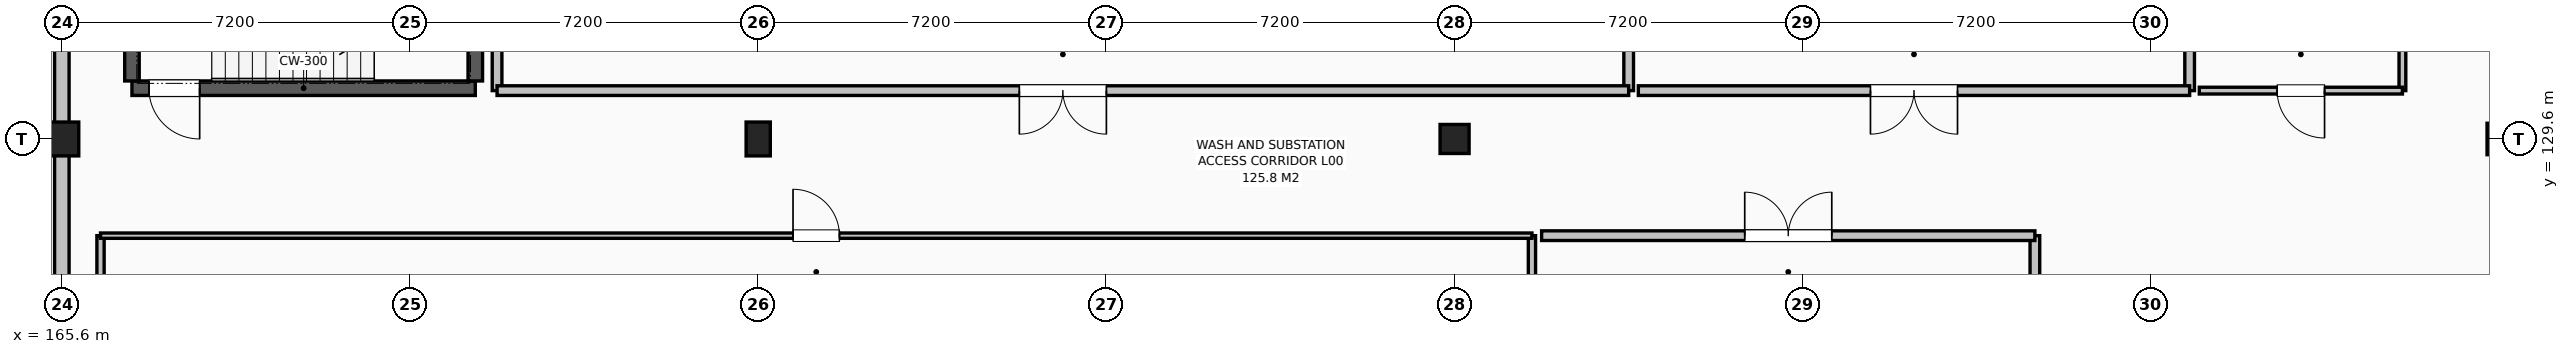
"""IFC4 building model, lengths in metres.
Left out: names, types, materials, properties, quantities, classifications, styles, units other than length and angle.
Written with IfcOpenShell. Run it as: python <this file> out.ifc"""

import sys

from ifc_helpers import new_model, si_unit, direction, frame, frame_2d, origin, origin_2d, place, context, subcontext, project, spatial, rectangle, circle, extrude, element, fill, save


model = new_model("IFC4")
c1 = context("Model", 3, precision=1e-05, world=origin(), true_north=direction((0.0, 1.0)))
c2 = subcontext(c1, "Body", "Model", "MODEL_VIEW")
j1 = project(units=[si_unit("LENGTHUNIT", "METRE"), si_unit("PLANEANGLEUNIT", "RADIAN")], contexts=[c1])
p1 = place(None, origin())
s1 = spatial("IfcSite", under=j1, at=p1, CompositionType="ELEMENT")
p2 = place(p1, origin())
s2 = spatial("IfcBuilding", under=s1, at=p2, CompositionType="ELEMENT")
p3 = place(p2, origin())
s3 = spatial("IfcBuildingStorey", under=s2, at=p3, CompositionType="ELEMENT", Elevation=0.0)
p4 = place(p3, frame((165.6, 129.6, 0.0), z_axis=(0.0, 0.0, 1.0), x_axis=(1.0, 0.0, 0.0)))
e1 = element("IfcColumn", 1, at=p4, inside=s3, PredefinedType="COLUMN", context=c2, shape_type="SweptSolid", body=[
    extrude(rectangle(XDim=0.7, YDim=0.7, at=origin_2d()), origin(), (0.0, 0.0, 1.0), 4.8),
])
p5 = place(p3, frame((180.0, 129.6, 0.0), z_axis=(0.0, 0.0, 1.0), x_axis=(1.0, 0.0, 0.0)))
e2 = element("IfcColumn", 2, at=p5, inside=s3, PredefinedType="COLUMN", context=c2, shape_type="SweptSolid", body=[
    extrude(rectangle(XDim=0.5, YDim=0.7, at=origin_2d()), origin(), (0.0, 0.0, 1.0), 4.8),
])
p6 = place(p3, frame((194.4, 129.6, 0.0), z_axis=(0.0, 0.0, 1.0), x_axis=(1.0, 0.0, 0.0)))
e3 = element("IfcColumn", 3, at=p6, inside=s3, PredefinedType="COLUMN", context=c2, shape_type="SweptSolid", body=[
    extrude(circle(Radius=0.3, at=origin_2d()), origin(), (0.0, 0.0, 1.0), 4.8),
])
p7 = place(p3, frame((216.0, 129.6, 0.0), z_axis=(0.0, 0.0, 1.0), x_axis=(1.0, 0.0, 0.0)))
e4 = element("IfcColumn", 4, at=p7, inside=s3, PredefinedType="COLUMN", context=c2, shape_type="SweptSolid", body=[
    extrude(rectangle(XDim=0.5, YDim=0.65, at=origin_2d()), origin(), (0.0, 0.0, 1.0), 4.8),
])
p8 = place(p3, frame((165.6, 144.0, 0.0), z_axis=(0.0, 0.0, 1.0), x_axis=(0.0, -1.0, 0.0)))
e5 = element("IfcWall", 5, at=p8, inside=s3, PredefinedType="SOLIDWALL", context=c2, shape_type="SweptSolid", body=[
    extrude(rectangle(XDim=28.8, YDim=0.3, at=frame_2d((14.4, 0.0))), origin(), (0.0, 0.0, 1.0), 4.25),
])
p9 = place(p8, frame((4.2, 0.0, 0.0)))
e6 = element("IfcOpeningElement", 6, at=p9, cuts=e5, PredefinedType="OPENING", context=c2, shape_type="SweptSolid", body=[
    extrude(rectangle(XDim=4.2, YDim=3.5, at=frame_2d((2.1, 1.75))), frame((0.0, 0.16, 0.0), z_axis=(0.0, -1.0, 0.0), x_axis=(1.0, 0.0, 0.0)), (0.0, 0.0, 1.0), 0.32),
])
p10 = place(p8, frame((18.2, 0.0, 0.0)))
e7 = element("IfcOpeningElement", 7, at=p10, cuts=e5, PredefinedType="OPENING", context=c2, shape_type="SweptSolid", body=[
    extrude(rectangle(XDim=4.2, YDim=3.5, at=frame_2d((2.1, 1.75))), frame((0.0, 0.16, 0.0), z_axis=(0.0, -1.0, 0.0), x_axis=(1.0, 0.0, 0.0)), (0.0, 0.0, 1.0), 0.32),
])
p11 = place(p3, frame((167.05, 130.65, 0.0), z_axis=(0.0, 0.0, 1.0), x_axis=(1.0, 0.0, 0.0)))
e8 = element("IfcWall", 8, at=p11, inside=s3, PredefinedType="SHEAR", context=c2, shape_type="SweptSolid", body=[
    extrude(rectangle(XDim=7.1, YDim=0.3, at=frame_2d((3.55, 0.0))), origin(), (0.0, 0.0, 1.0), 4.525),
])
p12 = place(p11, frame((0.35, 0.0, 0.0)))
e9 = element("IfcOpeningElement", 9, at=p12, cuts=e8, PredefinedType="OPENING", context=c2, shape_type="SweptSolid", body=[
    extrude(rectangle(XDim=1.05, YDim=2.15, at=frame_2d((0.525, 1.075))), frame((0.0, 0.16, 0.0), z_axis=(0.0, -1.0, 0.0), x_axis=(1.0, 0.0, 0.0)), (0.0, 0.0, 1.0), 0.32),
])
for number, where, z_axis, x_axis in (
    (10, (174.15, 130.8, 0.0), (0.0, 0.0, 1.0), (0.0, 1.0, 0.0)),
    (11, (167.05, 133.7, 0.0), (0.0, 0.0, 1.0), (0.0, -1.0, 0.0)),
):
    element("IfcWall", number, at=place(p3, frame(where, z_axis=z_axis, x_axis=x_axis)), inside=s3, PredefinedType="SHEAR", context=c2, shape_type="SweptSolid", body=[
        extrude(rectangle(XDim=2.9, YDim=0.3, at=frame_2d((1.45, 0.0))), origin(), (0.0, 0.0, 1.0), 4.525),
    ])
for number, where, z_axis, x_axis in (
    (12, (196.0, 116.45, 0.0), (0.0, 0.0, 1.0), (0.0, 1.0, 0.0)),
    (13, (166.4, 127.6, 0.0), (0.0, 0.0, 1.0), (0.0, -1.0, 0.0)),
):
    element("IfcWall", number, at=place(p3, frame(where, z_axis=z_axis, x_axis=x_axis)), inside=s3, PredefinedType="PARTITIONING", context=c2, shape_type="SweptSolid", body=[
        extrude(rectangle(XDim=11.15, YDim=0.15, at=frame_2d((5.575, 0.0))), origin(), (0.0, 0.0, 1.0), 4.1),
    ])
p13 = place(p3, frame((166.4, 127.6, 0.0), z_axis=(0.0, 0.0, 1.0), x_axis=(1.0, 0.0, 0.0)))
e14 = element("IfcWall", 14, at=p13, inside=s3, PredefinedType="PARTITIONING", context=c2, shape_type="SweptSolid", body=[
    extrude(rectangle(XDim=29.6, YDim=0.11, at=frame_2d((14.8, 0.0))), origin(), (0.0, 0.0, 1.0), 3.974),
])
p14 = place(p13, frame((14.32, 0.0, 0.0)))
e15 = element("IfcOpeningElement", 15, at=p14, cuts=e14, PredefinedType="OPENING", context=c2, shape_type="SweptSolid", body=[
    extrude(rectangle(XDim=0.96, YDim=2.15, at=frame_2d((0.48, 1.075))), frame((0.0, 0.065, 0.0), z_axis=(0.0, -1.0, 0.0), x_axis=(1.0, 0.0, 0.0)), (0.0, 0.0, 1.0), 0.13),
])
p15 = place(p3, frame((206.4, 116.45, 0.0), z_axis=(0.0, 0.0, 1.0), x_axis=(0.0, 1.0, 0.0)))
e16 = element("IfcWall", 16, at=p15, inside=s3, PredefinedType="SOLIDWALL", context=c2, shape_type="SweptSolid", body=[
    extrude(rectangle(XDim=11.15, YDim=0.2, at=frame_2d((5.575, 0.0))), origin(), (0.0, 0.0, 1.0), 4.1),
])
p16 = place(p3, frame((196.2, 127.6, 0.0), z_axis=(0.0, 0.0, 1.0), x_axis=(1.0, 0.0, 0.0)))
e17 = element("IfcWall", 17, at=p16, inside=s3, PredefinedType="SOLIDWALL", context=c2, shape_type="SweptSolid", body=[
    extrude(rectangle(XDim=10.2, YDim=0.2, at=frame_2d((5.1, 0.0))), origin(), (0.0, 0.0, 1.0), 4.1),
])
p17 = place(p16, frame((4.2, 0.0, 0.0)))
e18 = element("IfcOpeningElement", 18, at=p17, cuts=e17, PredefinedType="OPENING", context=c2, shape_type="SweptSolid", body=[
    extrude(rectangle(XDim=1.8, YDim=2.2, at=frame_2d((0.9, 1.1))), frame((0.0, 0.11, 0.0), z_axis=(0.0, -1.0, 0.0), x_axis=(1.0, 0.0, 0.0)), (0.0, 0.0, 1.0), 0.22),
])
for number, where, z_axis, x_axis in (
    (19, (198.0, 130.6, 0.0), (0.0, 0.0, 1.0), (0.0, 1.0, 0.0)),
    (20, (174.6, 142.75, 0.0), (0.0, 0.0, 1.0), (0.0, -1.0, 0.0)),
):
    element("IfcWall", number, at=place(p3, frame(where, z_axis=z_axis, x_axis=x_axis)), inside=s3, PredefinedType="SOLIDWALL", context=c2, shape_type="SweptSolid", body=[
        extrude(rectangle(XDim=12.15, YDim=0.2, at=frame_2d((6.075, 0.0))), origin(), (0.0, 0.0, 1.0), 4.1),
    ])
p18 = place(p3, frame((198.0, 130.6, 0.0), z_axis=(0.0, 0.0, 1.0), x_axis=(-1.0, 0.0, 0.0)))
e21 = element("IfcWall", 21, at=p18, inside=s3, PredefinedType="SOLIDWALL", context=c2, shape_type="SweptSolid", body=[
    extrude(rectangle(XDim=23.4, YDim=0.2, at=frame_2d((11.7, 0.0))), origin(), (0.0, 0.0, 1.0), 3.896),
])
p19 = place(p18, frame((10.8, 0.0, 0.0)))
e22 = element("IfcOpeningElement", 22, at=p19, cuts=e21, PredefinedType="OPENING", context=c2, shape_type="SweptSolid", body=[
    extrude(rectangle(XDim=1.8, YDim=2.2, at=frame_2d((0.9, 1.1))), frame((0.0, 0.11, 0.0), z_axis=(0.0, -1.0, 0.0), x_axis=(1.0, 0.0, 0.0)), (0.0, 0.0, 1.0), 0.22),
])
p20 = place(p3, frame((209.6, 130.6, 0.0), z_axis=(0.0, 0.0, 1.0), x_axis=(0.0, 1.0, 0.0)))
e23 = element("IfcWall", 23, at=p20, inside=s3, PredefinedType="SOLIDWALL", context=c2, shape_type="SweptSolid", body=[
    extrude(rectangle(XDim=12.15, YDim=0.2, at=frame_2d((6.075, 0.0))), origin(), (0.0, 0.0, 1.0), 4.1),
])
p21 = place(p3, frame((209.6, 130.6, 0.0), z_axis=(0.0, 0.0, 1.0), x_axis=(-1.0, 0.0, 0.0)))
e24 = element("IfcWall", 24, at=p21, inside=s3, PredefinedType="SOLIDWALL", context=c2, shape_type="SweptSolid", body=[
    extrude(rectangle(XDim=11.4, YDim=0.2, at=frame_2d((5.7, 0.0))), origin(), (0.0, 0.0, 1.0), 4.1),
])
p22 = place(p21, frame((4.8, 0.0, 0.0)))
e25 = element("IfcOpeningElement", 25, at=p22, cuts=e24, PredefinedType="OPENING", context=c2, shape_type="SweptSolid", body=[
    extrude(rectangle(XDim=1.8, YDim=2.2, at=frame_2d((0.9, 1.1))), frame((0.0, 0.11, 0.0), z_axis=(0.0, -1.0, 0.0), x_axis=(1.0, 0.0, 0.0)), (0.0, 0.0, 1.0), 0.22),
])
p23 = place(p3, frame((214.0, 130.6, 0.0), z_axis=(0.0, 0.0, 1.0), x_axis=(0.0, 1.0, 0.0)))
e26 = element("IfcWall", 26, at=p23, inside=s3, PredefinedType="PARTITIONING", context=c2, shape_type="SweptSolid", body=[
    extrude(rectangle(XDim=5.95, YDim=0.14, at=frame_2d((2.975, 0.0))), origin(), (0.0, 0.0, 1.0), 3.6),
])
p24 = place(p3, frame((214.0, 130.6, 0.0), z_axis=(0.0, 0.0, 1.0), x_axis=(-1.0, 0.0, 0.0)))
e27 = element("IfcWall", 27, at=p24, inside=s3, PredefinedType="PARTITIONING", context=c2, shape_type="SweptSolid", body=[
    extrude(rectangle(XDim=4.2, YDim=0.14, at=frame_2d((2.1, 0.0))), origin(), (0.0, 0.0, 1.0), 3.6),
])
p25 = place(p24, frame((1.61, 0.0, 0.0)))
e28 = element("IfcOpeningElement", 28, at=p25, cuts=e27, PredefinedType="OPENING", context=c2, shape_type="SweptSolid", body=[
    extrude(rectangle(XDim=0.98, YDim=2.15, at=frame_2d((0.49, 1.075))), frame((0.0, 0.08, 0.0), z_axis=(0.0, -1.0, 0.0), x_axis=(1.0, 0.0, 0.0)), (0.0, 0.0, 1.0), 0.16),
])
p26 = place(p12, frame((1.05, 0.0, 0.0), z_axis=(0.0, 0.0, 1.0), x_axis=(-1.0, 0.0, 0.0)))
e29 = element("IfcDoor", 29, at=p26, inside=s3, OperationType="SINGLE_SWING_LEFT", PredefinedType="DOOR", context=c2, shape_type="SweptSolid", body=[
    extrude(rectangle(XDim=1.05, YDim=2.15, at=frame_2d((0.525, 1.075))), frame((0.0, 0.025, 0.0), z_axis=(0.0, -1.0, 0.0), x_axis=(1.0, 0.0, 0.0)), (0.0, 0.0, 1.0), 0.05),
])
fill(e9, e29)
p27 = place(p14, origin())
e30 = element("IfcDoor", 30, at=p27, inside=s3, OperationType="SINGLE_SWING_LEFT", PredefinedType="DOOR", context=c2, shape_type="SweptSolid", body=[
    extrude(rectangle(XDim=0.96, YDim=2.15, at=frame_2d((0.48, 1.075))), frame((0.0, 0.025, 0.0), z_axis=(0.0, -1.0, 0.0), x_axis=(1.0, 0.0, 0.0)), (0.0, 0.0, 1.0), 0.05),
])
fill(e15, e30)
p28 = place(p17, origin())
e31 = element("IfcDoor", 31, at=p28, inside=s3, OperationType="DOUBLE_SWING_LEFT", PredefinedType="DOOR", context=c2, shape_type="SweptSolid", body=[
    extrude(rectangle(XDim=1.8, YDim=2.2, at=frame_2d((0.9, 1.1))), frame((0.0, 0.025, 0.0), z_axis=(0.0, -1.0, 0.0), x_axis=(1.0, 0.0, 0.0)), (0.0, 0.0, 1.0), 0.05),
])
fill(e18, e31)
p29 = place(p19, origin())
e32 = element("IfcDoor", 32, at=p29, inside=s3, OperationType="DOUBLE_SWING_LEFT", PredefinedType="DOOR", context=c2, shape_type="SweptSolid", body=[
    extrude(rectangle(XDim=1.8, YDim=2.2, at=frame_2d((0.9, 1.1))), frame((0.0, 0.025, 0.0), z_axis=(0.0, -1.0, 0.0), x_axis=(1.0, 0.0, 0.0)), (0.0, 0.0, 1.0), 0.05),
])
fill(e22, e32)
p30 = place(p22, origin())
e33 = element("IfcDoor", 33, at=p30, inside=s3, OperationType="DOUBLE_SWING_LEFT", PredefinedType="DOOR", context=c2, shape_type="SweptSolid", body=[
    extrude(rectangle(XDim=1.8, YDim=2.2, at=frame_2d((0.9, 1.1))), frame((0.0, 0.025, 0.0), z_axis=(0.0, -1.0, 0.0), x_axis=(1.0, 0.0, 0.0)), (0.0, 0.0, 1.0), 0.05),
])
fill(e25, e33)
p31 = place(p25, origin())
e34 = element("IfcDoor", 34, at=p31, inside=s3, OperationType="SINGLE_SWING_LEFT", PredefinedType="DOOR", context=c2, shape_type="SweptSolid", body=[
    extrude(rectangle(XDim=0.98, YDim=2.15, at=frame_2d((0.49, 1.075))), frame((0.0, 0.025, 0.0), z_axis=(0.0, -1.0, 0.0), x_axis=(1.0, 0.0, 0.0)), (0.0, 0.0, 1.0), 0.05),
])
fill(e28, e34)
save(model, sys.argv[1])
